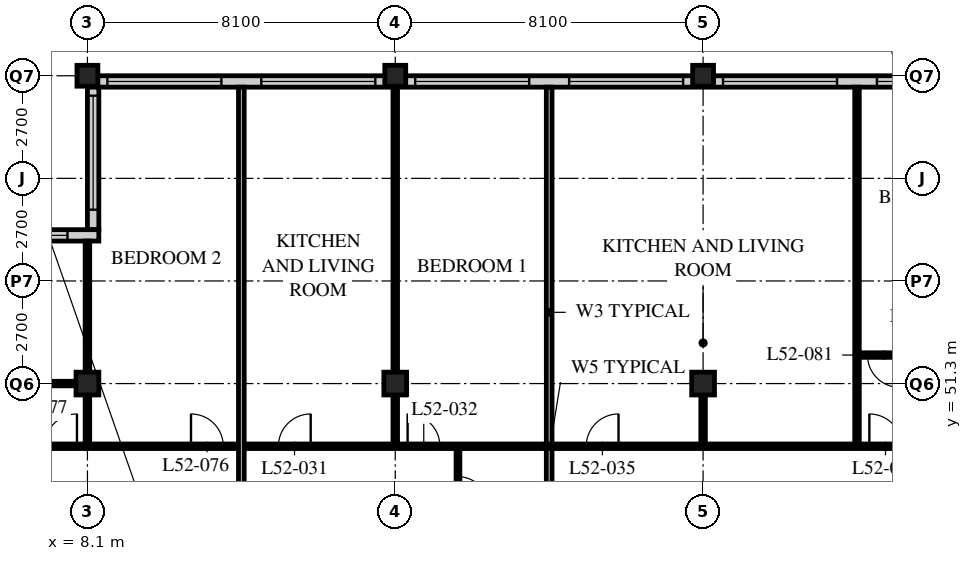
"""IFC4 building model, lengths in metres.
Left out: names, types, materials, properties, quantities, classifications, styles, units other than length and angle.
Written with IfcOpenShell. Run it as: python <this file> out.ifc"""

import sys

from ifc_helpers import new_model, si_unit, direction, frame, frame_2d, origin, origin_2d, place, context, subcontext, project, spatial, rectangle, hollow_rectangle, extrude, element, fill, save


model = new_model("IFC4")
c1 = context("Model", 3, precision=1e-05, world=origin(), true_north=direction((0.0, 1.0)))
c2 = subcontext(c1, "Body", "Model", "MODEL_VIEW")
j1 = project(units=[si_unit("LENGTHUNIT", "METRE"), si_unit("PLANEANGLEUNIT", "RADIAN")], contexts=[c1])
p1 = place(None, origin())
s1 = spatial("IfcSite", under=j1, at=p1, CompositionType="ELEMENT")
p2 = place(p1, origin())
s2 = spatial("IfcBuilding", under=s1, at=p2, CompositionType="ELEMENT")
p3 = place(p2, frame((0.0, 0.0, 202.8)))
s3 = spatial("IfcBuildingStorey", under=s2, at=p3, CompositionType="ELEMENT", Elevation=202.8)
p4 = place(p3, frame((8.1, 51.3, 0.0), z_axis=(0.0, 0.0, 1.0), x_axis=(1.0, 0.0, 0.0)))
e1 = element("IfcColumn", 1, at=p4, inside=s3, PredefinedType="COLUMN", context=c2, shape_type="SweptSolid", body=[
    extrude(hollow_rectangle(XDim=0.6, YDim=0.6, WallThickness=0.05, at=origin_2d()), origin(), (0.0, 0.0, 1.0), 3.6),
])
p5 = place(p3, frame((8.1, 59.4, 0.0), z_axis=(0.0, 0.0, 1.0), x_axis=(1.0, 0.0, 0.0)))
e2 = element("IfcColumn", 2, at=p5, inside=s3, PredefinedType="COLUMN", context=c2, shape_type="SweptSolid", body=[
    extrude(hollow_rectangle(XDim=0.55, YDim=0.55, WallThickness=0.045, at=origin_2d()), origin(), (0.0, 0.0, 1.0), 3.6),
])
p6 = place(p3, frame((16.2, 51.3, 0.0), z_axis=(0.0, 0.0, 1.0), x_axis=(1.0, 0.0, 0.0)))
e3 = element("IfcColumn", 3, at=p6, inside=s3, PredefinedType="COLUMN", context=c2, shape_type="SweptSolid", body=[
    extrude(hollow_rectangle(XDim=0.6, YDim=0.6, WallThickness=0.05, at=origin_2d()), origin(), (0.0, 0.0, 1.0), 3.6),
])
p7 = place(p3, frame((16.2, 59.4, 0.0), z_axis=(0.0, 0.0, 1.0), x_axis=(1.0, 0.0, 0.0)))
e4 = element("IfcColumn", 4, at=p7, inside=s3, PredefinedType="COLUMN", context=c2, shape_type="SweptSolid", body=[
    extrude(hollow_rectangle(XDim=0.55, YDim=0.55, WallThickness=0.045, at=origin_2d()), origin(), (0.0, 0.0, 1.0), 3.6),
])
p8 = place(p3, frame((24.3, 51.3, 0.0), z_axis=(0.0, 0.0, 1.0), x_axis=(1.0, 0.0, 0.0)))
e5 = element("IfcColumn", 5, at=p8, inside=s3, PredefinedType="COLUMN", context=c2, shape_type="SweptSolid", body=[
    extrude(hollow_rectangle(XDim=0.6, YDim=0.6, WallThickness=0.05, at=origin_2d()), origin(), (0.0, 0.0, 1.0), 3.6),
])
p9 = place(p3, frame((24.3, 59.4, 0.0), z_axis=(0.0, 0.0, 1.0), x_axis=(1.0, 0.0, 0.0)))
e6 = element("IfcColumn", 6, at=p9, inside=s3, PredefinedType="COLUMN", context=c2, shape_type="SweptSolid", body=[
    extrude(hollow_rectangle(XDim=0.55, YDim=0.55, WallThickness=0.045, at=origin_2d()), origin(), (0.0, 0.0, 1.0), 3.6),
])
p10 = place(p3, frame((48.3, 59.25, 0.0), z_axis=(0.0, 0.0, 1.0), x_axis=(-1.0, 0.0, 0.0)))
e7 = element("IfcWall", 7, at=p10, inside=s3, PredefinedType="SOLIDWALL", context=c2, shape_type="SweptSolid", body=[
    extrude(rectangle(XDim=40.2, YDim=0.3, at=frame_2d((20.1, 0.0))), origin(), (0.0, 0.0, 1.0), 3.39),
])
p11 = place(p10, frame((0.225, 0.0, 0.6)))
e8 = element("IfcOpeningElement", 8, at=p11, cuts=e7, PredefinedType="OPENING", context=c2, shape_type="SweptSolid", body=[
    extrude(rectangle(XDim=3.0, YDim=2.4, at=frame_2d((1.5, 1.2))), frame((0.0, 0.16, 0.0), z_axis=(0.0, -1.0, 0.0), x_axis=(1.0, 0.0, 0.0)), (0.0, 0.0, 1.0), 0.32),
])
p12 = place(p10, frame((4.275, 0.0, 0.6)))
e9 = element("IfcOpeningElement", 9, at=p12, cuts=e7, PredefinedType="OPENING", context=c2, shape_type="SweptSolid", body=[
    extrude(rectangle(XDim=3.0, YDim=2.4, at=frame_2d((1.5, 1.2))), frame((0.0, 0.16, 0.0), z_axis=(0.0, -1.0, 0.0), x_axis=(1.0, 0.0, 0.0)), (0.0, 0.0, 1.0), 0.32),
])
p13 = place(p10, frame((8.325, 0.0, 0.6)))
e10 = element("IfcOpeningElement", 10, at=p13, cuts=e7, PredefinedType="OPENING", context=c2, shape_type="SweptSolid", body=[
    extrude(rectangle(XDim=3.0, YDim=2.4, at=frame_2d((1.5, 1.2))), frame((0.0, 0.16, 0.0), z_axis=(0.0, -1.0, 0.0), x_axis=(1.0, 0.0, 0.0)), (0.0, 0.0, 1.0), 0.32),
])
p14 = place(p10, frame((12.375, 0.0, 0.6)))
e11 = element("IfcOpeningElement", 11, at=p14, cuts=e7, PredefinedType="OPENING", context=c2, shape_type="SweptSolid", body=[
    extrude(rectangle(XDim=3.0, YDim=2.4, at=frame_2d((1.5, 1.2))), frame((0.0, 0.16, 0.0), z_axis=(0.0, -1.0, 0.0), x_axis=(1.0, 0.0, 0.0)), (0.0, 0.0, 1.0), 0.32),
])
p15 = place(p10, frame((16.425, 0.0, 0.6)))
e12 = element("IfcOpeningElement", 12, at=p15, cuts=e7, PredefinedType="OPENING", context=c2, shape_type="SweptSolid", body=[
    extrude(rectangle(XDim=3.0, YDim=2.4, at=frame_2d((1.5, 1.2))), frame((0.0, 0.16, 0.0), z_axis=(0.0, -1.0, 0.0), x_axis=(1.0, 0.0, 0.0)), (0.0, 0.0, 1.0), 0.32),
])
p16 = place(p10, frame((20.475, 0.0, 0.6)))
e13 = element("IfcOpeningElement", 13, at=p16, cuts=e7, PredefinedType="OPENING", context=c2, shape_type="SweptSolid", body=[
    extrude(rectangle(XDim=3.0, YDim=2.4, at=frame_2d((1.5, 1.2))), frame((0.0, 0.16, 0.0), z_axis=(0.0, -1.0, 0.0), x_axis=(1.0, 0.0, 0.0)), (0.0, 0.0, 1.0), 0.32),
])
p17 = place(p10, frame((24.525, 0.0, 0.6)))
e14 = element("IfcOpeningElement", 14, at=p17, cuts=e7, PredefinedType="OPENING", context=c2, shape_type="SweptSolid", body=[
    extrude(rectangle(XDim=3.0, YDim=2.4, at=frame_2d((1.5, 1.2))), frame((0.0, 0.16, 0.0), z_axis=(0.0, -1.0, 0.0), x_axis=(1.0, 0.0, 0.0)), (0.0, 0.0, 1.0), 0.32),
])
p18 = place(p10, frame((28.575, 0.0, 0.6)))
e15 = element("IfcOpeningElement", 15, at=p18, cuts=e7, PredefinedType="OPENING", context=c2, shape_type="SweptSolid", body=[
    extrude(rectangle(XDim=3.0, YDim=2.4, at=frame_2d((1.5, 1.2))), frame((0.0, 0.16, 0.0), z_axis=(0.0, -1.0, 0.0), x_axis=(1.0, 0.0, 0.0)), (0.0, 0.0, 1.0), 0.32),
])
p19 = place(p10, frame((32.625, 0.0, 0.6)))
e16 = element("IfcOpeningElement", 16, at=p19, cuts=e7, PredefinedType="OPENING", context=c2, shape_type="SweptSolid", body=[
    extrude(rectangle(XDim=3.0, YDim=2.4, at=frame_2d((1.5, 1.2))), frame((0.0, 0.16, 0.0), z_axis=(0.0, -1.0, 0.0), x_axis=(1.0, 0.0, 0.0)), (0.0, 0.0, 1.0), 0.32),
])
p20 = place(p10, frame((36.675, 0.0, 0.6)))
e17 = element("IfcOpeningElement", 17, at=p20, cuts=e7, PredefinedType="OPENING", context=c2, shape_type="SweptSolid", body=[
    extrude(rectangle(XDim=3.0, YDim=2.4, at=frame_2d((1.5, 1.2))), frame((0.0, 0.16, 0.0), z_axis=(0.0, -1.0, 0.0), x_axis=(1.0, 0.0, 0.0)), (0.0, 0.0, 1.0), 0.32),
])
p21 = place(p3, frame((8.25, 59.1, 0.0), z_axis=(0.0, 0.0, 1.0), x_axis=(0.0, -1.0, 0.0)))
e18 = element("IfcWall", 18, at=p21, inside=s3, PredefinedType="SOLIDWALL", context=c2, shape_type="SweptSolid", body=[
    extrude(rectangle(XDim=3.75, YDim=0.3, at=frame_2d((1.875, 0.0))), origin(), (0.0, 0.0, 1.0), 3.39),
])
p22 = place(p21, frame((0.225, 0.0, 0.6)))
e19 = element("IfcOpeningElement", 19, at=p22, cuts=e18, PredefinedType="OPENING", context=c2, shape_type="SweptSolid", body=[
    extrude(rectangle(XDim=3.0, YDim=2.0, at=frame_2d((1.5, 1.0))), frame((0.0, 0.16, 0.0), z_axis=(0.0, -1.0, 0.0), x_axis=(1.0, 0.0, 0.0)), (0.0, 0.0, 1.0), 0.32),
])
p23 = place(p3, frame((8.4, 55.2, 0.0), z_axis=(0.0, 0.0, 1.0), x_axis=(-1.0, 0.0, 0.0)))
e20 = element("IfcWall", 20, at=p23, inside=s3, PredefinedType="SOLIDWALL", context=c2, shape_type="SweptSolid", body=[
    extrude(rectangle(XDim=4.35, YDim=0.3, at=frame_2d((2.175, 0.0))), origin(), (0.0, 0.0, 1.0), 3.39),
])
p24 = place(p23, frame((0.825, 0.0, 0.6)))
e21 = element("IfcOpeningElement", 21, at=p24, cuts=e20, PredefinedType="OPENING", context=c2, shape_type="SweptSolid", body=[
    extrude(rectangle(XDim=3.0, YDim=2.0, at=frame_2d((1.5, 1.0))), frame((0.0, 0.16, 0.0), z_axis=(0.0, -1.0, 0.0), x_axis=(1.0, 0.0, 0.0)), (0.0, 0.0, 1.0), 0.32),
])
p25 = place(p3, frame((17.85, 47.25, 0.0), z_axis=(0.0, 0.0, 1.0), x_axis=(0.0, 1.0, 0.0)))
e22 = element("IfcWall", 22, at=p25, inside=s3, PredefinedType="PARTITIONING", context=c2, shape_type="SweptSolid", body=[
    extrude(rectangle(XDim=2.4, YDim=0.1, at=frame_2d((1.2, 0.0))), origin(), (0.0, 0.0, 1.0), 3.39),
])
p26 = place(p25, frame((0.8, 0.0, 0.0)))
e23 = element("IfcOpeningElement", 23, at=p26, cuts=e22, PredefinedType="OPENING", context=c2, shape_type="SweptSolid", body=[
    extrude(rectangle(XDim=0.8, YDim=2.1, at=frame_2d((0.4, 1.05))), frame((0.0, 0.06, 0.0), z_axis=(0.0, -1.0, 0.0), x_axis=(1.0, 0.0, 0.0)), (0.0, 0.0, 1.0), 0.12),
])
p27 = place(p3, frame((16.2, 49.65, 0.0), z_axis=(0.0, 0.0, 1.0), x_axis=(0.0, 1.0, 0.0)))
e24 = element("IfcWall", 24, at=p27, inside=s3, PredefinedType="PARTITIONING", context=c2, shape_type="SweptSolid", body=[
    extrude(rectangle(XDim=9.45, YDim=0.12, at=frame_2d((4.725, 0.0))), origin(), (0.0, 0.0, 1.0), 2.778),
])
p28 = place(p3, frame((20.25, 47.25, 0.0), z_axis=(0.0, 0.0, 1.0), x_axis=(0.0, 1.0, 0.0)))
e25 = element("IfcWall", 25, at=p28, inside=s3, PredefinedType="PARTITIONING", context=c2, shape_type="SweptSolid", body=[
    extrude(rectangle(XDim=11.85, YDim=0.15, at=frame_2d((5.925, 0.0))), origin(), (0.0, 0.0, 1.0), 3.39),
])
p29 = place(p3, frame((28.35, 49.65, 0.0), z_axis=(0.0, 0.0, 1.0), x_axis=(0.0, 1.0, 0.0)))
e26 = element("IfcWall", 26, at=p29, inside=s3, PredefinedType="PARTITIONING", context=c2, shape_type="SweptSolid", body=[
    extrude(rectangle(XDim=9.45, YDim=0.12, at=frame_2d((4.725, 0.0))), origin(), (0.0, 0.0, 1.0), 3.39),
])
p30 = place(p3, frame((4.1, 49.65, 0.0), z_axis=(0.0, 0.0, 1.0), x_axis=(1.0, 0.0, 0.0)))
e27 = element("IfcWall", 27, at=p30, inside=s3, PredefinedType="PARTITIONING", context=c2, shape_type="SweptSolid", body=[
    extrude(rectangle(XDim=32.35, YDim=0.12, at=frame_2d((16.175, 0.0))), origin(), (0.0, 0.0, 1.0), 3.39),
])
p31 = place(p30, frame((9.025, 0.0, 0.0)))
e28 = element("IfcOpeningElement", 28, at=p31, cuts=e27, PredefinedType="OPENING", context=c2, shape_type="SweptSolid", body=[
    extrude(rectangle(XDim=0.85, YDim=2.1, at=frame_2d((0.425, 1.05))), frame((0.0, 0.07, 0.0), z_axis=(0.0, -1.0, 0.0), x_axis=(1.0, 0.0, 0.0)), (0.0, 0.0, 1.0), 0.14),
])
p32 = place(p30, frame((12.425, 0.0, 0.0)))
e29 = element("IfcOpeningElement", 29, at=p32, cuts=e27, PredefinedType="OPENING", context=c2, shape_type="SweptSolid", body=[
    extrude(rectangle(XDim=0.85, YDim=2.1, at=frame_2d((0.425, 1.05))), frame((0.0, 0.07, 0.0), z_axis=(0.0, -1.0, 0.0), x_axis=(1.0, 0.0, 0.0)), (0.0, 0.0, 1.0), 0.14),
])
p33 = place(p30, frame((17.125, 0.0, 0.0)))
e30 = element("IfcOpeningElement", 30, at=p33, cuts=e27, PredefinedType="OPENING", context=c2, shape_type="SweptSolid", body=[
    extrude(rectangle(XDim=0.85, YDim=2.1, at=frame_2d((0.425, 1.05))), frame((0.0, 0.07, 0.0), z_axis=(0.0, -1.0, 0.0), x_axis=(1.0, 0.0, 0.0)), (0.0, 0.0, 1.0), 0.14),
])
p34 = place(p30, frame((24.575, 0.0, 0.0)))
e31 = element("IfcOpeningElement", 31, at=p34, cuts=e27, PredefinedType="OPENING", context=c2, shape_type="SweptSolid", body=[
    extrude(rectangle(XDim=0.85, YDim=2.1, at=frame_2d((0.425, 1.05))), frame((0.0, 0.07, 0.0), z_axis=(0.0, -1.0, 0.0), x_axis=(1.0, 0.0, 0.0)), (0.0, 0.0, 1.0), 0.14),
])
p35 = place(p30, frame((28.625, 0.0, 0.0)))
e32 = element("IfcOpeningElement", 32, at=p35, cuts=e27, PredefinedType="OPENING", context=c2, shape_type="SweptSolid", body=[
    extrude(rectangle(XDim=0.85, YDim=2.1, at=frame_2d((0.425, 1.05))), frame((0.0, 0.07, 0.0), z_axis=(0.0, -1.0, 0.0), x_axis=(1.0, 0.0, 0.0)), (0.0, 0.0, 1.0), 0.14),
])
p36 = place(p30, frame((6.725, 0.0, 0.0)))
e33 = element("IfcOpeningElement", 33, at=p36, cuts=e27, PredefinedType="OPENING", context=c2, shape_type="SweptSolid", body=[
    extrude(rectangle(XDim=0.85, YDim=2.1, at=frame_2d((0.425, 1.05))), frame((0.0, 0.07, 0.0), z_axis=(0.0, -1.0, 0.0), x_axis=(1.0, 0.0, 0.0)), (0.0, 0.0, 1.0), 0.14),
])
p37 = place(p30, frame((2.875, 0.0, 0.0)))
e34 = element("IfcOpeningElement", 34, at=p37, cuts=e27, PredefinedType="OPENING", context=c2, shape_type="SweptSolid", body=[
    extrude(rectangle(XDim=0.85, YDim=2.1, at=frame_2d((0.425, 1.05))), frame((0.0, 0.07, 0.0), z_axis=(0.0, -1.0, 0.0), x_axis=(1.0, 0.0, 0.0)), (0.0, 0.0, 1.0), 0.14),
])
p38 = place(p3, frame((8.1, 49.65, 0.0), z_axis=(0.0, 0.0, 1.0), x_axis=(0.0, 1.0, 0.0)))
e35 = element("IfcWall", 35, at=p38, inside=s3, PredefinedType="PARTITIONING", context=c2, shape_type="SweptSolid", body=[
    extrude(rectangle(XDim=5.4, YDim=0.12, at=frame_2d((2.7, 0.0))), origin(), (0.0, 0.0, 1.0), 2.778),
])
p39 = place(p3, frame((8.1, 51.3, 0.0), z_axis=(0.0, 0.0, 1.0), x_axis=(-1.0, 0.0, 0.0)))
e36 = element("IfcWall", 36, at=p39, inside=s3, PredefinedType="PARTITIONING", context=c2, shape_type="SweptSolid", body=[
    extrude(rectangle(XDim=3.75, YDim=0.12, at=frame_2d((1.875, 0.0))), origin(), (0.0, 0.0, 1.0), 2.778),
])
p40 = place(p39, frame((1.875, 0.0, 0.0)))
e37 = element("IfcOpeningElement", 37, at=p40, cuts=e36, PredefinedType="OPENING", context=c2, shape_type="SweptSolid", body=[
    extrude(rectangle(XDim=0.85, YDim=2.1, at=frame_2d((0.425, 1.05))), frame((0.0, 0.07, 0.0), z_axis=(0.0, -1.0, 0.0), x_axis=(1.0, 0.0, 0.0)), (0.0, 0.0, 1.0), 0.14),
])
p41 = place(p3, frame((12.15, 47.25, 0.0), z_axis=(0.0, 0.0, 1.0), x_axis=(0.0, 1.0, 0.0)))
e38 = element("IfcWall", 38, at=p41, inside=s3, PredefinedType="PARTITIONING", context=c2, shape_type="SweptSolid", body=[
    extrude(rectangle(XDim=11.85, YDim=0.15, at=frame_2d((5.925, 0.0))), origin(), (0.0, 0.0, 1.0), 3.39),
])
p42 = place(p3, frame((28.35, 52.05, 0.0), z_axis=(0.0, 0.0, 1.0), x_axis=(1.0, 0.0, 0.0)))
e39 = element("IfcWall", 39, at=p42, inside=s3, PredefinedType="PARTITIONING", context=c2, shape_type="SweptSolid", body=[
    extrude(rectangle(XDim=1.76, YDim=0.12, at=frame_2d((0.88, 0.0))), origin(), (0.0, 0.0, 1.0), 3.39),
])
p43 = place(p42, frame((0.275, 0.0, 0.0)))
e40 = element("IfcOpeningElement", 40, at=p43, cuts=e39, PredefinedType="OPENING", context=c2, shape_type="SweptSolid", body=[
    extrude(rectangle(XDim=0.85, YDim=2.1, at=frame_2d((0.425, 1.05))), frame((0.0, 0.07, 0.0), z_axis=(0.0, -1.0, 0.0), x_axis=(1.0, 0.0, 0.0)), (0.0, 0.0, 1.0), 0.14),
])
p44 = place(p3, frame((24.3, 49.65, 0.0), z_axis=(0.0, 0.0, 1.0), x_axis=(0.0, 1.0, 0.0)))
e41 = element("IfcWall", 41, at=p44, inside=s3, PredefinedType="PARTITIONING", context=c2, shape_type="SweptSolid", body=[
    extrude(rectangle(XDim=1.35, YDim=0.12, at=frame_2d((0.675, 0.0))), origin(), (0.0, 0.0, 1.0), 2.778),
])
p45 = place(p15, origin())
e42 = element("IfcWindow", 42, at=p45, inside=s3, PartitioningType="SINGLE_PANEL", PredefinedType="WINDOW", context=c2, shape_type="SweptSolid", body=[
    extrude(rectangle(XDim=3.0, YDim=2.4, at=frame_2d((1.5, 1.2))), frame((0.0, 0.03, 0.0), z_axis=(0.0, -1.0, 0.0), x_axis=(1.0, 0.0, 0.0)), (0.0, 0.0, 1.0), 0.06),
])
fill(e12, e42)
p46 = place(p16, origin())
e43 = element("IfcWindow", 43, at=p46, inside=s3, PartitioningType="SINGLE_PANEL", PredefinedType="WINDOW", context=c2, shape_type="SweptSolid", body=[
    extrude(rectangle(XDim=3.0, YDim=2.4, at=frame_2d((1.5, 1.2))), frame((0.0, 0.03, 0.0), z_axis=(0.0, -1.0, 0.0), x_axis=(1.0, 0.0, 0.0)), (0.0, 0.0, 1.0), 0.06),
])
fill(e13, e43)
p47 = place(p17, origin())
e44 = element("IfcWindow", 44, at=p47, inside=s3, PartitioningType="SINGLE_PANEL", PredefinedType="WINDOW", context=c2, shape_type="SweptSolid", body=[
    extrude(rectangle(XDim=3.0, YDim=2.4, at=frame_2d((1.5, 1.2))), frame((0.0, 0.03, 0.0), z_axis=(0.0, -1.0, 0.0), x_axis=(1.0, 0.0, 0.0)), (0.0, 0.0, 1.0), 0.06),
])
fill(e14, e44)
p48 = place(p18, origin())
e45 = element("IfcWindow", 45, at=p48, inside=s3, PartitioningType="SINGLE_PANEL", PredefinedType="WINDOW", context=c2, shape_type="SweptSolid", body=[
    extrude(rectangle(XDim=3.0, YDim=2.4, at=frame_2d((1.5, 1.2))), frame((0.0, 0.03, 0.0), z_axis=(0.0, -1.0, 0.0), x_axis=(1.0, 0.0, 0.0)), (0.0, 0.0, 1.0), 0.06),
])
fill(e15, e45)
p49 = place(p19, origin())
e46 = element("IfcWindow", 46, at=p49, inside=s3, PartitioningType="SINGLE_PANEL", PredefinedType="WINDOW", context=c2, shape_type="SweptSolid", body=[
    extrude(rectangle(XDim=3.0, YDim=2.4, at=frame_2d((1.5, 1.2))), frame((0.0, 0.03, 0.0), z_axis=(0.0, -1.0, 0.0), x_axis=(1.0, 0.0, 0.0)), (0.0, 0.0, 1.0), 0.06),
])
fill(e16, e46)
p50 = place(p20, origin())
e47 = element("IfcWindow", 47, at=p50, inside=s3, PartitioningType="SINGLE_PANEL", PredefinedType="WINDOW", context=c2, shape_type="SweptSolid", body=[
    extrude(rectangle(XDim=3.0, YDim=2.4, at=frame_2d((1.5, 1.2))), frame((0.0, 0.03, 0.0), z_axis=(0.0, -1.0, 0.0), x_axis=(1.0, 0.0, 0.0)), (0.0, 0.0, 1.0), 0.06),
])
fill(e17, e47)
p51 = place(p22, origin())
e48 = element("IfcWindow", 48, at=p51, inside=s3, PartitioningType="SINGLE_PANEL", PredefinedType="WINDOW", context=c2, shape_type="SweptSolid", body=[
    extrude(rectangle(XDim=3.0, YDim=2.0, at=frame_2d((1.5, 1.0))), frame((0.0, 0.03, 0.0), z_axis=(0.0, -1.0, 0.0), x_axis=(1.0, 0.0, 0.0)), (0.0, 0.0, 1.0), 0.06),
])
fill(e19, e48)
p52 = place(p24, origin())
e49 = element("IfcWindow", 49, at=p52, inside=s3, PartitioningType="SINGLE_PANEL", PredefinedType="WINDOW", context=c2, shape_type="SweptSolid", body=[
    extrude(rectangle(XDim=3.0, YDim=2.0, at=frame_2d((1.5, 1.0))), frame((0.0, 0.03, 0.0), z_axis=(0.0, -1.0, 0.0), x_axis=(1.0, 0.0, 0.0)), (0.0, 0.0, 1.0), 0.06),
])
fill(e21, e49)
p53 = place(p26, origin())
e50 = element("IfcDoor", 50, at=p53, inside=s3, OperationType="SINGLE_SWING_RIGHT", PredefinedType="DOOR", context=c2, shape_type="SweptSolid", body=[
    extrude(rectangle(XDim=0.8, YDim=2.1, at=frame_2d((0.4, 1.05))), frame((0.0, 0.025, 0.0), z_axis=(0.0, -1.0, 0.0), x_axis=(1.0, 0.0, 0.0)), (0.0, 0.0, 1.0), 0.05),
])
fill(e23, e50)
p54 = place(p31, origin())
e51 = element("IfcDoor", 51, at=p54, inside=s3, OperationType="SINGLE_SWING_RIGHT", PredefinedType="DOOR", context=c2, shape_type="SweptSolid", body=[
    extrude(rectangle(XDim=0.85, YDim=2.1, at=frame_2d((0.425, 1.05))), frame((0.0, 0.025, 0.0), z_axis=(0.0, -1.0, 0.0), x_axis=(1.0, 0.0, 0.0)), (0.0, 0.0, 1.0), 0.05),
])
fill(e28, e51)
p55 = place(p32, origin())
e52 = element("IfcDoor", 52, at=p55, inside=s3, OperationType="SINGLE_SWING_LEFT", PredefinedType="DOOR", context=c2, shape_type="SweptSolid", body=[
    extrude(rectangle(XDim=0.85, YDim=2.1, at=frame_2d((0.425, 1.05))), frame((0.0, 0.025, 0.0), z_axis=(0.0, -1.0, 0.0), x_axis=(1.0, 0.0, 0.0)), (0.0, 0.0, 1.0), 0.05),
])
fill(e29, e52)
p56 = place(p33, origin())
e53 = element("IfcDoor", 53, at=p56, inside=s3, OperationType="SINGLE_SWING_RIGHT", PredefinedType="DOOR", context=c2, shape_type="SweptSolid", body=[
    extrude(rectangle(XDim=0.85, YDim=2.1, at=frame_2d((0.425, 1.05))), frame((0.0, 0.025, 0.0), z_axis=(0.0, -1.0, 0.0), x_axis=(1.0, 0.0, 0.0)), (0.0, 0.0, 1.0), 0.05),
])
fill(e30, e53)
p57 = place(p34, origin())
e54 = element("IfcDoor", 54, at=p57, inside=s3, OperationType="SINGLE_SWING_LEFT", PredefinedType="DOOR", context=c2, shape_type="SweptSolid", body=[
    extrude(rectangle(XDim=0.85, YDim=2.1, at=frame_2d((0.425, 1.05))), frame((0.0, 0.025, 0.0), z_axis=(0.0, -1.0, 0.0), x_axis=(1.0, 0.0, 0.0)), (0.0, 0.0, 1.0), 0.05),
])
fill(e31, e54)
p58 = place(p36, origin())
e55 = element("IfcDoor", 55, at=p58, inside=s3, OperationType="SINGLE_SWING_LEFT", PredefinedType="DOOR", context=c2, shape_type="SweptSolid", body=[
    extrude(rectangle(XDim=0.85, YDim=2.1, at=frame_2d((0.425, 1.05))), frame((0.0, 0.025, 0.0), z_axis=(0.0, -1.0, 0.0), x_axis=(1.0, 0.0, 0.0)), (0.0, 0.0, 1.0), 0.05),
])
fill(e33, e55)
p59 = place(p37, origin())
e56 = element("IfcDoor", 56, at=p59, inside=s3, OperationType="SINGLE_SWING_RIGHT", PredefinedType="DOOR", context=c2, shape_type="SweptSolid", body=[
    extrude(rectangle(XDim=0.85, YDim=2.1, at=frame_2d((0.425, 1.05))), frame((0.0, 0.025, 0.0), z_axis=(0.0, -1.0, 0.0), x_axis=(1.0, 0.0, 0.0)), (0.0, 0.0, 1.0), 0.05),
])
fill(e34, e56)
p60 = place(p43, origin())
e57 = element("IfcDoor", 57, at=p60, inside=s3, OperationType="SINGLE_SWING_LEFT", PredefinedType="DOOR", context=c2, shape_type="SweptSolid", body=[
    extrude(rectangle(XDim=0.85, YDim=2.1, at=frame_2d((0.425, 1.05))), frame((0.0, 0.025, 0.0), z_axis=(0.0, -1.0, 0.0), x_axis=(1.0, 0.0, 0.0)), (0.0, 0.0, 1.0), 0.05),
])
fill(e40, e57)
save(model, sys.argv[1])
